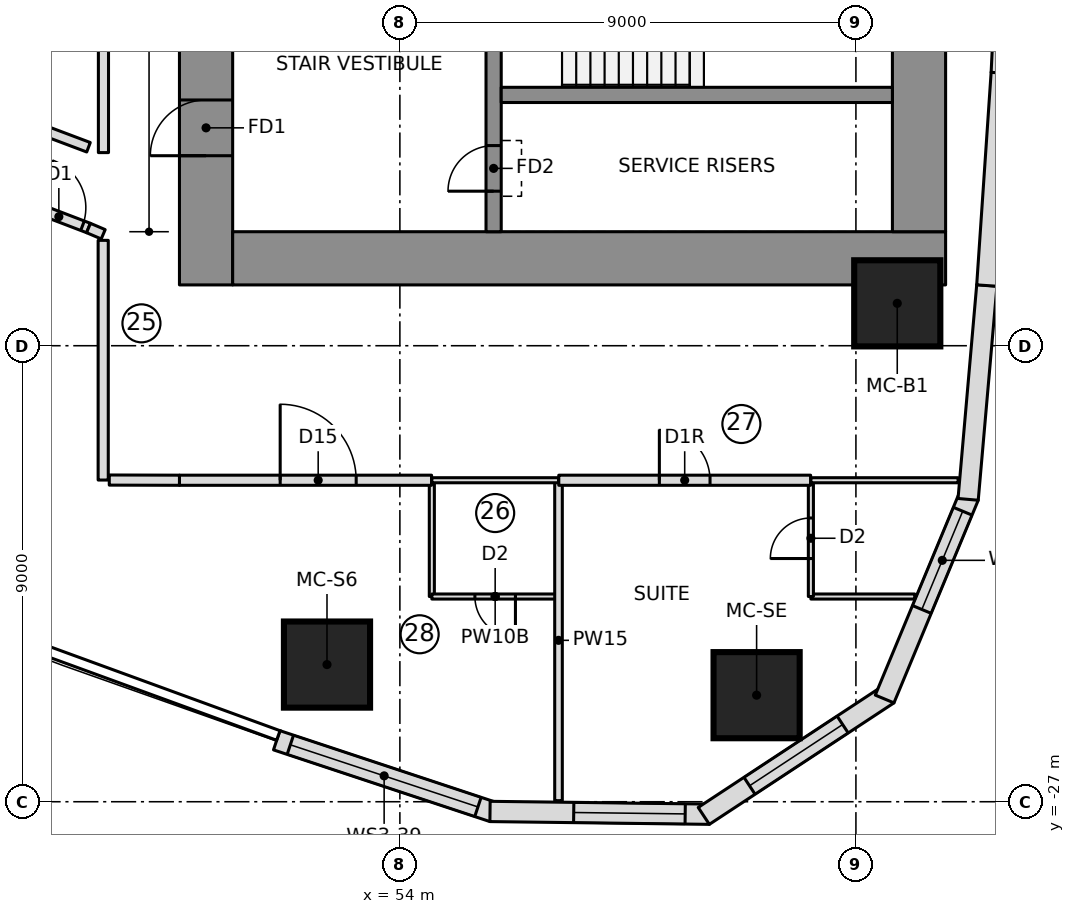
"""IFC4 building model, lengths in metres.
Left out: names, types, materials, properties, quantities, classifications, styles, units other than length and angle.
Written with IfcOpenShell. Run it as: python <this file> out.ifc"""

import sys

from ifc_helpers import new_model, si_unit, direction, frame, frame_2d, origin, origin_2d, place, context, subcontext, project, spatial, polyline, rectangle, outline, extrude, element, fill, save


model = new_model("IFC4")
c1 = context("Model", 3, precision=1e-05, world=origin(), true_north=direction((0.0, 1.0)))
c2 = subcontext(c1, "Body", "Model", "MODEL_VIEW")
j1 = project(units=[si_unit("LENGTHUNIT", "METRE"), si_unit("PLANEANGLEUNIT", "RADIAN")], contexts=[c1])
p1 = place(None, origin())
s1 = spatial("IfcSite", under=j1, at=p1, CompositionType="ELEMENT")
p2 = place(p1, origin())
s2 = spatial("IfcBuilding", under=s1, at=p2, CompositionType="ELEMENT")
p3 = place(p2, frame((0.0, 0.0, 92.0)))
s3 = spatial("IfcBuildingStorey", under=s2, at=p3, CompositionType="ELEMENT", Elevation=92.0)
p4 = place(p3, frame((50.175, -16.8, 0.0), z_axis=(0.0, 0.0, 1.0), x_axis=(0.0, 1.0, 0.0)))
e1 = element("IfcWall", 1, at=p4, inside=s3, PredefinedType="SHEAR", context=c2, shape_type="SweptSolid", body=[
    extrude(rectangle(XDim=10.15, YDim=1.05, at=frame_2d((5.075, 0.0))), origin(), (0.0, 0.0, 1.0), 3.55),
])
p5 = place(p4, frame((2.55, 0.0, 0.0)))
e2 = element("IfcOpeningElement", 2, at=p5, cuts=e1, PredefinedType="OPENING", context=c2, shape_type="SweptSolid", body=[
    extrude(rectangle(XDim=1.1, YDim=2.1, at=frame_2d((0.55, 1.05))), frame((0.0, 0.535, 0.0), z_axis=(0.0, -1.0, 0.0), x_axis=(1.0, 0.0, 0.0)), (0.0, 0.0, 1.0), 1.07),
])
p6 = place(p3, frame((50.7, -16.275, 0.0), z_axis=(0.0, 0.0, 1.0), x_axis=(1.0, 0.0, 0.0)))
e3 = element("IfcWall", 3, at=p6, inside=s3, PredefinedType="SHEAR", context=c2, shape_type="SweptSolid", body=[
    extrude(rectangle(XDim=14.07, YDim=1.05, at=frame_2d((7.035, 0.0))), origin(), (0.0, 0.0, 1.0), 3.55),
])
p7 = place(p3, frame((64.245, -15.75, 0.0), z_axis=(0.0, 0.0, 1.0), x_axis=(0.0, 1.0, 0.0)))
e4 = element("IfcWall", 4, at=p7, inside=s3, PredefinedType="SHEAR", context=c2, shape_type="SweptSolid", body=[
    extrude(rectangle(XDim=6.361, YDim=1.05, at=frame_2d((3.181, 0.0))), origin(), (0.0, 0.0, 1.0), 3.55),
])
p8 = place(p3, frame((55.85, -15.75, 0.0), z_axis=(0.0, 0.0, 1.0), x_axis=(0.0, 1.0, 0.0)))
e5 = element("IfcWall", 5, at=p8, inside=s3, PredefinedType="SHEAR", context=c2, shape_type="SweptSolid", body=[
    extrude(rectangle(XDim=5.4, YDim=0.3, at=frame_2d((2.7, 0.0))), origin(), (0.0, 0.0, 1.0), 3.55),
])
p9 = place(p8, frame((3.6, 0.0, 0.0)))
e6 = element("IfcOpeningElement", 6, at=p9, cuts=e5, PredefinedType="OPENING", context=c2, shape_type="SweptSolid", body=[
    extrude(rectangle(XDim=1.1, YDim=2.1, at=frame_2d((0.55, 1.05))), frame((0.0, 0.16, 0.0), z_axis=(0.0, -1.0, 0.0), x_axis=(1.0, 0.0, 0.0)), (0.0, 0.0, 1.0), 0.32),
])
p10 = place(p8, frame((0.8, 0.0, 0.0)))
e7 = element("IfcOpeningElement", 7, at=p10, cuts=e5, PredefinedType="OPENING", context=c2, shape_type="SweptSolid", body=[
    extrude(rectangle(XDim=0.9, YDim=2.1, at=frame_2d((0.45, 1.05))), frame((0.0, 0.16, 0.0), z_axis=(0.0, -1.0, 0.0), x_axis=(1.0, 0.0, 0.0)), (0.0, 0.0, 1.0), 0.32),
])
p11 = place(p3, frame((56.0, -13.05, 0.0), z_axis=(0.0, 0.0, 1.0), x_axis=(1.0, 0.0, 0.0)))
e8 = element("IfcWall", 8, at=p11, inside=s3, PredefinedType="SHEAR", context=c2, shape_type="SweptSolid", body=[
    extrude(rectangle(XDim=7.72, YDim=0.3, at=frame_2d((3.86, 0.0))), origin(), (0.0, 0.0, 1.0), 3.55),
])
for number, where, z_axis, x_axis in (
    (9, (52.562, -24.293, 0.0), (0.0, 0.0, 1.0), (1.0, 0.0, 0.0)),
    (10, (61.04, -24.897, 0.0), (0.0, 0.0, 1.0), (1.0, 0.0, 0.0)),
    (11, (63.816, -17.164, 0.0), (0.0, 0.0, 1.0), (1.0, 0.0, 0.0)),
):
    element("IfcColumn", number, at=place(p3, frame(where, z_axis=z_axis, x_axis=x_axis)), inside=s3, PredefinedType="COLUMN", context=c2, shape_type="SweptSolid", body=[
        extrude(rectangle(XDim=1.7, YDim=1.7, at=origin_2d()), origin(), (0.0, 0.0, 1.0), 3.55),
    ])
p12 = place(p3, frame((51.569, -25.787, 0.0), z_axis=(0.0, 0.0, 1.0), x_axis=(0.94925004851, -0.314522408429, 0.0)))
e12 = element("IfcWall", 12, at=p12, inside=s3, PredefinedType="NOTDEFINED", context=c2, shape_type="SweptSolid", body=[
    extrude(outline(polyline([(0.0, -0.2), (4.499, -0.2), (4.437, 0.2), (0.0, 0.2), (0.0, -0.2)])), origin(), (0.0, 0.0, 1.0), 3.25),
])
p13 = place(p12, frame((0.284, 0.0, 0.9)))
e13 = element("IfcOpeningElement", 13, at=p13, cuts=e12, PredefinedType="OPENING", context=c2, shape_type="SweptSolid", body=[
    extrude(rectangle(XDim=3.9, YDim=1.8, at=frame_2d((1.95, 0.9))), frame((0.0, 0.21, 0.0), z_axis=(0.0, -1.0, 0.0), x_axis=(1.0, 0.0, 0.0)), (0.0, 0.0, 1.0), 0.42),
])
p14 = place(p3, frame((55.81, -27.192, 0.0), z_axis=(0.0, 0.0, 1.0), x_axis=(0.999919718849, -0.012671063772, 0.0)))
e14 = element("IfcWall", 14, at=p14, inside=s3, PredefinedType="NOTDEFINED", context=c2, shape_type="SweptSolid", body=[
    extrude(outline(polyline([(-0.031, -0.2), (4.3, -0.2), (4.177, 0.2), (0.031, 0.2), (-0.031, -0.2)])), origin(), (0.0, 0.0, 1.0), 3.25),
])
p15 = place(p14, frame((1.621, 0.0, 0.6)))
e15 = element("IfcOpeningElement", 15, at=p15, cuts=e14, PredefinedType="OPENING", context=c2, shape_type="SweptSolid", body=[
    extrude(outline(polyline([(0.0, 1.35), (0.084, 1.771), (0.322, 2.128), (0.679, 2.366), (1.1, 2.45), (1.521, 2.366), (1.878, 2.128), (2.116, 1.771), (2.2, 1.35), (2.2, 1.1), (2.116, 0.679), (1.878, 0.322), (1.521, 0.084), (1.1, 0.0), (0.679, 0.084), (0.322, 0.322), (0.084, 0.679), (0.0, 1.1), (0.0, 1.35)])), frame((0.0, 0.21, 0.0), z_axis=(0.0, -1.0, 0.0), x_axis=(1.0, 0.0, 0.0)), (0.0, 0.0, 1.0), 0.42),
])
p16 = place(p3, frame((60.049, -27.246, 0.0), z_axis=(0.0, 0.0, 1.0), x_axis=(0.835340523653, 0.549732852887, 0.0)))
e16 = element("IfcWall", 16, at=p16, inside=s3, PredefinedType="NOTDEFINED", context=c2, shape_type="SweptSolid", body=[
    extrude(outline(polyline([(-0.061, -0.2), (4.3, -0.2), (4.178, 0.2), (0.061, 0.2), (-0.061, -0.2)])), origin(), (0.0, 0.0, 1.0), 3.25),
])
p17 = place(p16, frame((1.02, 0.0, 0.6)))
e17 = element("IfcOpeningElement", 17, at=p17, cuts=e16, PredefinedType="OPENING", context=c2, shape_type="SweptSolid", body=[
    extrude(outline(polyline([(0.0, 1.35), (0.084, 1.771), (0.322, 2.128), (0.679, 2.366), (1.1, 2.45), (1.521, 2.366), (1.878, 2.128), (2.116, 1.771), (2.2, 1.35), (2.2, 1.1), (2.116, 0.679), (1.878, 0.322), (1.521, 0.084), (1.1, 0.0), (0.679, 0.084), (0.322, 0.322), (0.084, 0.679), (0.0, 1.1), (0.0, 1.35)])), frame((0.0, 0.21, 0.0), z_axis=(0.0, -1.0, 0.0), x_axis=(1.0, 0.0, 0.0)), (0.0, 0.0, 1.0), 0.42),
])
p18 = place(p3, frame((63.59, -24.916, 0.0), z_axis=(0.0, 0.0, 1.0), x_axis=(0.383997751971, 0.923334027577, 0.0)))
e18 = element("IfcWall", 18, at=p18, inside=s3, PredefinedType="NOTDEFINED", context=c2, shape_type="SweptSolid", body=[
    extrude(outline(polyline([(-0.061, -0.2), (4.27, -0.2), (4.208, 0.2), (0.061, 0.2), (-0.061, -0.2)])), origin(), (0.0, 0.0, 1.0), 3.25),
])
p19 = place(p18, frame((1.852, 0.0, 0.6)))
e19 = element("IfcOpeningElement", 19, at=p19, cuts=e18, PredefinedType="OPENING", context=c2, shape_type="SweptSolid", body=[
    extrude(outline(polyline([(0.0, 1.4), (0.08, 1.802), (0.308, 2.142), (0.648, 2.37), (1.05, 2.45), (1.452, 2.37), (1.792, 2.142), (2.02, 1.802), (2.1, 1.4), (2.1, 1.05), (2.02, 0.648), (1.792, 0.308), (1.452, 0.08), (1.05, 0.0), (0.648, 0.08), (0.308, 0.308), (0.08, 0.648), (0.0, 1.05), (0.0, 1.4)])), frame((0.0, 0.21, 0.0), z_axis=(0.0, -1.0, 0.0), x_axis=(1.0, 0.0, 0.0)), (0.0, 0.0, 1.0), 0.42),
])
p20 = place(p3, frame((65.217, -21.002, 0.0), z_axis=(0.0, 0.0, 1.0), x_axis=(0.086992730434, 0.996208946382, 0.0)))
e20 = element("IfcWall", 20, at=p20, inside=s3, PredefinedType="NOTDEFINED", context=c2, shape_type="SweptSolid", body=[
    extrude(outline(polyline([(-0.031, -0.2), (4.209, -0.2), (4.205, 0.2), (0.031, 0.2), (-0.031, -0.2)])), origin(), (0.0, 0.0, 1.0), 3.25),
])
p21 = place(p3, frame((65.583, -16.811, 0.0), z_axis=(0.0, 0.0, 1.0), x_axis=(0.067724559895, 0.997704056315, 0.0)))
e21 = element("IfcWall", 21, at=p21, inside=s3, PredefinedType="NOTDEFINED", context=c2, shape_type="SweptSolid", body=[
    extrude(outline(polyline([(-0.002, -0.2), (4.209, -0.2), (4.205, 0.2), (0.002, 0.2), (-0.002, -0.2)])), origin(), (0.0, 0.0, 1.0), 3.25),
])
p22 = place(p3, frame((65.868, -12.614, 0.0), z_axis=(0.0, 0.0, 1.0), x_axis=(0.048342691508, 0.998830808585, 0.0)))
e22 = element("IfcWall", 22, at=p22, inside=s3, PredefinedType="NOTDEFINED", context=c2, shape_type="SweptSolid", body=[
    extrude(outline(polyline([(-0.002, -0.2), (4.209, -0.2), (4.205, 0.2), (0.002, 0.2), (-0.002, -0.2)])), origin(), (0.0, 0.0, 1.0), 3.25),
])
p23 = place(p3, frame((54.631, -22.95, 0.0), z_axis=(0.0, 0.0, 1.0), x_axis=(0.0, 1.0, 0.0)))
e23 = element("IfcWall", 23, at=p23, inside=s3, PredefinedType="PARTITIONING", context=c2, shape_type="SweptSolid", body=[
    extrude(rectangle(XDim=2.3, YDim=0.1, at=frame_2d((1.15, 0.0))), origin(), (0.0, 0.0, 1.0), 3.25),
])
p24 = place(p3, frame((57.131, -22.95, 0.0), z_axis=(0.0, 0.0, 1.0), x_axis=(-1.0, 0.0, 0.0)))
e24 = element("IfcWall", 24, at=p24, inside=s3, PredefinedType="PARTITIONING", context=c2, shape_type="SweptSolid", body=[
    extrude(rectangle(XDim=2.5, YDim=0.1, at=frame_2d((1.25, 0.0))), origin(), (0.0, 0.0, 1.0), 3.25),
])
p25 = place(p24, frame((0.85, 0.0, 0.0)))
e25 = element("IfcOpeningElement", 25, at=p25, cuts=e24, PredefinedType="OPENING", context=c2, shape_type="SweptSolid", body=[
    extrude(rectangle(XDim=0.8, YDim=2.1, at=frame_2d((0.4, 1.05))), frame((0.0, 0.06, 0.0), z_axis=(0.0, -1.0, 0.0), x_axis=(1.0, 0.0, 0.0)), (0.0, 0.0, 1.0), 0.12),
])
p26 = place(p3, frame((64.16, -22.95, 0.0), z_axis=(0.0, 0.0, 1.0), x_axis=(-1.0, 0.0, 0.0)))
e26 = element("IfcWall", 26, at=p26, inside=s3, PredefinedType="PARTITIONING", context=c2, shape_type="SweptSolid", body=[
    extrude(rectangle(XDim=2.049, YDim=0.1, at=frame_2d((1.025, 0.0))), origin(), (0.0, 0.0, 1.0), 3.25),
])
p27 = place(p3, frame((62.111, -22.95, 0.0), z_axis=(0.0, 0.0, 1.0), x_axis=(0.0, 1.0, 0.0)))
e27 = element("IfcWall", 27, at=p27, inside=s3, PredefinedType="PARTITIONING", context=c2, shape_type="SweptSolid", body=[
    extrude(rectangle(XDim=2.3, YDim=0.1, at=frame_2d((1.15, 0.0))), origin(), (0.0, 0.0, 1.0), 3.25),
])
p28 = place(p27, frame((0.75, 0.0, 0.0)))
e28 = element("IfcOpeningElement", 28, at=p28, cuts=e27, PredefinedType="OPENING", context=c2, shape_type="SweptSolid", body=[
    extrude(rectangle(XDim=0.8, YDim=2.1, at=frame_2d((0.4, 1.05))), frame((0.0, 0.06, 0.0), z_axis=(0.0, -1.0, 0.0), x_axis=(1.0, 0.0, 0.0)), (0.0, 0.0, 1.0), 0.12),
])
p29 = place(p3, frame((57.131, -26.979, 0.0), z_axis=(0.0, 0.0, 1.0), x_axis=(0.0, 1.0, 0.0)))
e29 = element("IfcWall", 29, at=p29, inside=s3, PredefinedType="PARTITIONING", context=c2, shape_type="SweptSolid", body=[
    extrude(rectangle(XDim=6.329, YDim=0.15, at=frame_2d((3.165, 0.0))), origin(), (0.0, 0.0, 1.0), 3.25),
])
p30 = place(p3, frame((49.65, -20.655, 0.0), z_axis=(0.0, 0.0, 1.0), x_axis=(1.0, 0.0, 0.0)))
e30 = element("IfcWall", 30, at=p30, inside=s3, PredefinedType="PARTITIONING", context=c2, shape_type="SweptSolid", body=[
    extrude(rectangle(XDim=4.976, YDim=0.2, at=frame_2d((2.488, 0.0))), origin(), (0.0, 0.0, 1.0), 3.25),
])
p31 = place(p30, frame((1.988, 0.0, 0.0)))
e31 = element("IfcOpeningElement", 31, at=p31, cuts=e30, PredefinedType="OPENING", context=c2, shape_type="SweptSolid", body=[
    extrude(rectangle(XDim=1.5, YDim=2.1, at=frame_2d((0.75, 1.05))), frame((0.0, 0.11, 0.0), z_axis=(0.0, -1.0, 0.0), x_axis=(1.0, 0.0, 0.0)), (0.0, 0.0, 1.0), 0.22),
])
p32 = place(p3, frame((57.135, -20.655, 0.0), z_axis=(0.0, 0.0, 1.0), x_axis=(1.0, 0.0, 0.0)))
e32 = element("IfcWall", 32, at=p32, inside=s3, PredefinedType="PARTITIONING", context=c2, shape_type="SweptSolid", body=[
    extrude(rectangle(XDim=4.971, YDim=0.2, at=frame_2d((2.485, 0.0))), origin(), (0.0, 0.0, 1.0), 3.25),
])
p33 = place(p32, frame((1.985, 0.0, 0.0)))
e33 = element("IfcOpeningElement", 33, at=p33, cuts=e32, PredefinedType="OPENING", context=c2, shape_type="SweptSolid", body=[
    extrude(rectangle(XDim=1.0, YDim=2.1, at=frame_2d((0.5, 1.05))), frame((0.0, 0.11, 0.0), z_axis=(0.0, -1.0, 0.0), x_axis=(1.0, 0.0, 0.0)), (0.0, 0.0, 1.0), 0.22),
])
p34 = place(p3, frame((54.631, -20.655, 0.0), z_axis=(0.0, 0.0, 1.0), x_axis=(1.0, 0.0, 0.0)))
e34 = element("IfcWall", 34, at=p34, inside=s3, PredefinedType="PARTITIONING", context=c2, shape_type="SweptSolid", body=[
    extrude(rectangle(XDim=2.5, YDim=0.1, at=frame_2d((1.25, 0.0))), origin(), (0.0, 0.0, 1.0), 3.25),
])
p35 = place(p3, frame((62.111, -20.655, 0.0), z_axis=(0.0, 0.0, 1.0), x_axis=(1.0, 0.0, 0.0)))
e35 = element("IfcWall", 35, at=p35, inside=s3, PredefinedType="PARTITIONING", context=c2, shape_type="SweptSolid", body=[
    extrude(rectangle(XDim=2.906, YDim=0.1, at=frame_2d((1.453, 0.0))), origin(), (0.0, 0.0, 1.0), 3.25),
])
p36 = place(p3, frame((43.953, -14.188, 0.0), z_axis=(0.0, 0.0, 1.0), x_axis=(0.934288494055, -0.356517895592, 0.0)))
e36 = element("IfcWall", 36, at=p36, inside=s3, PredefinedType="PARTITIONING", context=c2, shape_type="SweptSolid", body=[
    extrude(rectangle(XDim=4.177, YDim=0.2, at=frame_2d((2.088, 0.0))), origin(), (0.0, 0.0, 1.0), 3.25),
])
p37 = place(p36, frame((3.05, 0.0, 0.0)))
e37 = element("IfcOpeningElement", 37, at=p37, cuts=e36, PredefinedType="OPENING", context=c2, shape_type="SweptSolid", body=[
    extrude(rectangle(XDim=1.0, YDim=2.1, at=frame_2d((0.5, 1.05))), frame((0.0, 0.11, 0.0), z_axis=(0.0, -1.0, 0.0), x_axis=(1.0, 0.0, 0.0)), (0.0, 0.0, 1.0), 0.22),
])
p38 = place(p3, frame((47.855, -14.083, 0.0), z_axis=(0.0, 0.0, 1.0), x_axis=(-0.935907269358, 0.352246480696, 0.0)))
e38 = element("IfcWall", 38, at=p38, inside=s3, PredefinedType="PARTITIONING", context=c2, shape_type="SweptSolid", body=[
    extrude(rectangle(XDim=1.239, YDim=0.2, at=frame_2d((0.619, 0.0))), origin(), (0.0, 0.0, 1.0), 3.25),
])
p39 = place(p3, frame((48.15, 14.189, 0.0), z_axis=(0.0, 0.0, 1.0), x_axis=(0.0, -1.0, 0.0)))
e39 = element("IfcWall", 39, at=p39, inside=s3, PredefinedType="PARTITIONING", context=c2, shape_type="SweptSolid", body=[
    extrude(rectangle(XDim=28.377, YDim=0.2, at=frame_2d((14.189, 0.0))), origin(), (0.0, 0.0, 1.0), 3.25),
])
p40 = place(p3, frame((47.855, -15.677, 0.0), z_axis=(0.0, 0.0, 1.0), x_axis=(0.919863783517, -0.392237963199, 0.0)))
e40 = element("IfcWall", 40, at=p40, inside=s3, PredefinedType="PARTITIONING", context=c2, shape_type="SweptSolid", body=[
    extrude(rectangle(XDim=0.316, YDim=0.2, at=frame_2d((0.158, 0.0))), origin(), (0.0, 0.0, 1.0), 3.25),
])
p41 = place(p3, frame((48.145, -15.92, 0.0), z_axis=(0.0, 0.0, 1.0), x_axis=(-5.1610239e-05, -0.999999998668, 0.0)))
e41 = element("IfcWall", 41, at=p41, inside=s3, PredefinedType="PARTITIONING", context=c2, shape_type="SweptSolid", body=[
    extrude(rectangle(XDim=4.73, YDim=0.2, at=frame_2d((2.365, 0.0))), origin(), (0.0, 0.0, 1.0), 3.25),
])
p42 = place(p3, frame((48.265, -20.651, 0.0), z_axis=(0.0, 0.0, 1.0), x_axis=(0.999996503144, -0.002644560569, 0.0)))
e42 = element("IfcWall", 42, at=p42, inside=s3, PredefinedType="PARTITIONING", context=c2, shape_type="SweptSolid", body=[
    extrude(rectangle(XDim=1.385, YDim=0.2, at=frame_2d((0.692, 0.0))), origin(), (0.0, 0.0, 1.0), 3.25),
])
p43 = place(p13, origin())
e43 = element("IfcWindow", 43, at=p43, inside=s3, PartitioningType="SINGLE_PANEL", PredefinedType="WINDOW", context=c2, shape_type="SweptSolid", body=[
    extrude(rectangle(XDim=3.9, YDim=1.8, at=frame_2d((1.95, 0.9))), frame((0.0, 0.17, 0.0), z_axis=(0.0, -1.0, 0.0), x_axis=(1.0, 0.0, 0.0)), (0.0, 0.0, 1.0), 0.06),
])
fill(e13, e43)
p44 = place(p15, origin())
e44 = element("IfcWindow", 44, at=p44, inside=s3, PartitioningType="SINGLE_PANEL", PredefinedType="WINDOW", context=c2, shape_type="SweptSolid", body=[
    extrude(outline(polyline([(0.0, 1.35), (0.084, 1.771), (0.322, 2.128), (0.679, 2.366), (1.1, 2.45), (1.521, 2.366), (1.878, 2.128), (2.116, 1.771), (2.2, 1.35), (2.2, 1.1), (2.116, 0.679), (1.878, 0.322), (1.521, 0.084), (1.1, 0.0), (0.679, 0.084), (0.322, 0.322), (0.084, 0.679), (0.0, 1.1), (0.0, 1.35)])), frame((0.0, 0.17, 0.0), z_axis=(0.0, -1.0, 0.0), x_axis=(1.0, 0.0, 0.0)), (0.0, 0.0, 1.0), 0.06),
])
fill(e15, e44)
p45 = place(p17, origin())
e45 = element("IfcWindow", 45, at=p45, inside=s3, PartitioningType="SINGLE_PANEL", PredefinedType="WINDOW", context=c2, shape_type="SweptSolid", body=[
    extrude(outline(polyline([(0.0, 1.35), (0.084, 1.771), (0.322, 2.128), (0.679, 2.366), (1.1, 2.45), (1.521, 2.366), (1.878, 2.128), (2.116, 1.771), (2.2, 1.35), (2.2, 1.1), (2.116, 0.679), (1.878, 0.322), (1.521, 0.084), (1.1, 0.0), (0.679, 0.084), (0.322, 0.322), (0.084, 0.679), (0.0, 1.1), (0.0, 1.35)])), frame((0.0, 0.17, 0.0), z_axis=(0.0, -1.0, 0.0), x_axis=(1.0, 0.0, 0.0)), (0.0, 0.0, 1.0), 0.06),
])
fill(e17, e45)
p46 = place(p19, origin())
e46 = element("IfcWindow", 46, at=p46, inside=s3, PartitioningType="SINGLE_PANEL", PredefinedType="WINDOW", context=c2, shape_type="SweptSolid", body=[
    extrude(outline(polyline([(0.0, 1.4), (0.08, 1.802), (0.308, 2.142), (0.648, 2.37), (1.05, 2.45), (1.452, 2.37), (1.792, 2.142), (2.02, 1.802), (2.1, 1.4), (2.1, 1.05), (2.02, 0.648), (1.792, 0.308), (1.452, 0.08), (1.05, 0.0), (0.648, 0.08), (0.308, 0.308), (0.08, 0.648), (0.0, 1.05), (0.0, 1.4)])), frame((0.0, 0.17, 0.0), z_axis=(0.0, -1.0, 0.0), x_axis=(1.0, 0.0, 0.0)), (0.0, 0.0, 1.0), 0.06),
])
fill(e19, e46)
p47 = place(p25, origin())
e47 = element("IfcDoor", 47, at=p47, inside=s3, OperationType="SINGLE_SWING_LEFT", PredefinedType="DOOR", context=c2, shape_type="SweptSolid", body=[
    extrude(rectangle(XDim=0.8, YDim=2.1, at=frame_2d((0.4, 1.05))), frame((0.0, 0.025, 0.0), z_axis=(0.0, -1.0, 0.0), x_axis=(1.0, 0.0, 0.0)), (0.0, 0.0, 1.0), 0.05),
])
fill(e25, e47)
p48 = place(p28, origin())
e48 = element("IfcDoor", 48, at=p48, inside=s3, OperationType="SINGLE_SWING_LEFT", PredefinedType="DOOR", context=c2, shape_type="SweptSolid", body=[
    extrude(rectangle(XDim=0.8, YDim=2.1, at=frame_2d((0.4, 1.05))), frame((0.0, 0.025, 0.0), z_axis=(0.0, -1.0, 0.0), x_axis=(1.0, 0.0, 0.0)), (0.0, 0.0, 1.0), 0.05),
])
fill(e28, e48)
p49 = place(p37, origin())
e49 = element("IfcDoor", 49, at=p49, inside=s3, OperationType="SINGLE_SWING_LEFT", PredefinedType="DOOR", context=c2, shape_type="SweptSolid", body=[
    extrude(rectangle(XDim=1.0, YDim=2.1, at=frame_2d((0.5, 1.05))), frame((0.0, 0.025, 0.0), z_axis=(0.0, -1.0, 0.0), x_axis=(1.0, 0.0, 0.0)), (0.0, 0.0, 1.0), 0.05),
])
fill(e37, e49)
p50 = place(p31, origin())
e50 = element("IfcDoor", 50, at=p50, inside=s3, OperationType="DOUBLE_DOOR_SINGLE_SWING", PredefinedType="DOOR", context=c2, shape_type="SweptSolid", body=[
    extrude(rectangle(XDim=1.5, YDim=2.1, at=frame_2d((0.75, 1.05))), frame((0.0, 0.025, 0.0), z_axis=(0.0, -1.0, 0.0), x_axis=(1.0, 0.0, 0.0)), (0.0, 0.0, 1.0), 0.05),
])
fill(e31, e50)
p51 = place(p33, origin())
e51 = element("IfcDoor", 51, at=p51, inside=s3, OperationType="SINGLE_SWING_RIGHT", PredefinedType="DOOR", context=c2, shape_type="SweptSolid", body=[
    extrude(rectangle(XDim=1.0, YDim=2.1, at=frame_2d((0.5, 1.05))), frame((0.0, 0.025, 0.0), z_axis=(0.0, -1.0, 0.0), x_axis=(1.0, 0.0, 0.0)), (0.0, 0.0, 1.0), 0.05),
])
fill(e33, e51)
p52 = place(p5, origin())
e52 = element("IfcDoor", 52, at=p52, inside=s3, OperationType="SINGLE_SWING_RIGHT", PredefinedType="DOOR", context=c2, shape_type="SweptSolid", body=[
    extrude(rectangle(XDim=1.1, YDim=2.1, at=frame_2d((0.55, 1.05))), frame((0.0, 0.025, 0.0), z_axis=(0.0, -1.0, 0.0), x_axis=(1.0, 0.0, 0.0)), (0.0, 0.0, 1.0), 0.05),
])
fill(e2, e52)
p53 = place(p10, origin())
e53 = element("IfcDoor", 53, at=p53, inside=s3, OperationType="SINGLE_SWING_LEFT", PredefinedType="DOOR", context=c2, shape_type="SweptSolid", body=[
    extrude(rectangle(XDim=0.9, YDim=2.1, at=frame_2d((0.45, 1.05))), frame((0.0, 0.025, 0.0), z_axis=(0.0, -1.0, 0.0), x_axis=(1.0, 0.0, 0.0)), (0.0, 0.0, 1.0), 0.05),
])
fill(e7, e53)
save(model, sys.argv[1])
